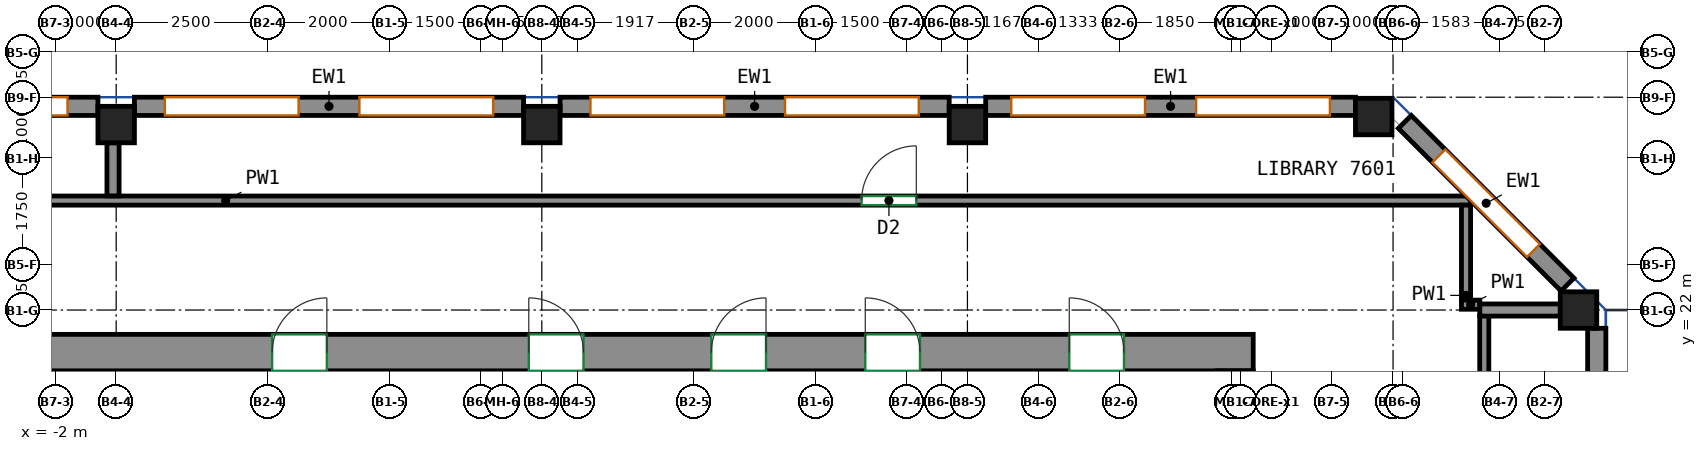
"""IFC4 building model, lengths in metres.
Left out: names, types, materials, properties, quantities, classifications, styles, units other than length and angle.
Written with IfcOpenShell. Run it as: python <this file> out.ifc"""

import sys

from ifc_helpers import new_model, si_unit, direction, frame, frame_2d, origin, origin_2d, place, context, subcontext, project, spatial, rectangle, extrude, source, transform, mapped, element, fill, save


model = new_model("IFC4")
c1 = context("Model", 3, precision=1e-05, world=origin(), true_north=direction((0.0, 1.0)))
c2 = subcontext(c1, "Body", "Model", "MODEL_VIEW")
j1 = project(units=[si_unit("LENGTHUNIT", "METRE"), si_unit("PLANEANGLEUNIT", "RADIAN")], contexts=[c1])
p1 = place(None, origin())
s1 = spatial("IfcSite", under=j1, at=p1, CompositionType="ELEMENT")
p2 = place(p1, origin())
s2 = spatial("IfcBuilding", under=s1, at=p2, CompositionType="ELEMENT")
p3 = place(p2, frame((0.0, 0.0, 305.2)))
s3 = spatial("IfcBuildingStorey", under=s2, at=p3, CompositionType="ELEMENT", Elevation=305.2)
m1 = source(origin(), c2, "Body", "SweptSolid", [
    extrude(rectangle(XDim=0.6, YDim=0.6, at=origin_2d()), origin(), (0.0, 0.0, 1.0), 3.12),
])
for number, where, z_axis, x_axis in (
    (1, (-1.0, 25.05, 0.0), (0.0, 0.0, 1.0), (1.0, 0.0, 0.0)),
    (2, (6.0, 25.05, 0.0), (0.0, 0.0, 1.0), (1.0, 0.0, 0.0)),
    (3, (13.0, 25.05, 0.0), (0.0, 0.0, 1.0), (1.0, 0.0, 0.0)),
    (4, (19.682, 25.182, 0.0), (0.0, 0.0, 1.0), (1.0, 0.0, 0.0)),
    (5, (23.05, 22.0, 0.0), (0.0, 0.0, 1.0), (1.0, 0.0, 0.0)),
):
    element("IfcColumn", number, at=place(p3, frame(where, z_axis=z_axis, x_axis=x_axis)), inside=s3, PredefinedType="COLUMN", context=c2, shape_type="MappedRepresentation", body=[
        mapped(m1, transform((0.0, 0.0, 0.0))),
    ])
m2 = source(origin(), c2, "Body", "SweptSolid", [
    extrude(rectangle(XDim=33.3, YDim=0.6, at=frame_2d((16.65, 0.0))), origin(), (0.0, 0.0, 1.0), 3.12),
])
p4 = place(p3, frame((-15.6, 21.3, 0.0), z_axis=(0.0, 0.0, 1.0), x_axis=(1.0, 0.0, 0.0)))
e6 = element("IfcWall", 6, at=p4, inside=s3, PredefinedType="SHEAR", context=c2, shape_type="MappedRepresentation", body=[
    mapped(m2, transform((0.0, 0.0, 0.0))),
])
p5 = place(p4, frame((6.431, 0.0, 0.0)))
e7 = element("IfcOpeningElement", 7, at=p5, cuts=e6, PredefinedType="OPENING", context=c2, shape_type="SweptSolid", body=[
    extrude(rectangle(XDim=0.9, YDim=2.1, at=frame_2d((0.45, 1.05))), frame((0.0, 0.31, 0.0), z_axis=(0.0, -1.0, 0.0), x_axis=(1.0, 0.0, 0.0)), (0.0, 0.0, 1.0), 0.62),
])
p6 = place(p4, frame((11.738, 0.0, 0.0)))
e8 = element("IfcOpeningElement", 8, at=p6, cuts=e6, PredefinedType="OPENING", context=c2, shape_type="SweptSolid", body=[
    extrude(rectangle(XDim=0.9, YDim=2.1, at=frame_2d((0.45, 1.05))), frame((0.0, 0.31, 0.0), z_axis=(0.0, -1.0, 0.0), x_axis=(1.0, 0.0, 0.0)), (0.0, 0.0, 1.0), 0.62),
])
p7 = place(p4, frame((17.165, 0.0, 0.0)))
e9 = element("IfcOpeningElement", 9, at=p7, cuts=e6, PredefinedType="OPENING", context=c2, shape_type="SweptSolid", body=[
    extrude(rectangle(XDim=0.9, YDim=2.1, at=frame_2d((0.45, 1.05))), frame((0.0, 0.31, 0.0), z_axis=(0.0, -1.0, 0.0), x_axis=(1.0, 0.0, 0.0)), (0.0, 0.0, 1.0), 0.62),
])
p8 = place(p4, frame((21.386, 0.0, 0.0)))
e10 = element("IfcOpeningElement", 10, at=p8, cuts=e6, PredefinedType="OPENING", context=c2, shape_type="SweptSolid", body=[
    extrude(rectangle(XDim=0.9, YDim=2.1, at=frame_2d((0.45, 1.05))), frame((0.0, 0.31, 0.0), z_axis=(0.0, -1.0, 0.0), x_axis=(1.0, 0.0, 0.0)), (0.0, 0.0, 1.0), 0.62),
])
p9 = place(p4, frame((24.387, 0.0, 0.0)))
e11 = element("IfcOpeningElement", 11, at=p9, cuts=e6, PredefinedType="OPENING", context=c2, shape_type="SweptSolid", body=[
    extrude(rectangle(XDim=0.9, YDim=2.1, at=frame_2d((0.45, 1.05))), frame((0.0, 0.31, 0.0), z_axis=(0.0, -1.0, 0.0), x_axis=(1.0, 0.0, 0.0)), (0.0, 0.0, 1.0), 0.62),
])
p10 = place(p4, frame((26.92, 0.0, 0.0)))
e12 = element("IfcOpeningElement", 12, at=p10, cuts=e6, PredefinedType="OPENING", context=c2, shape_type="SweptSolid", body=[
    extrude(rectangle(XDim=0.9, YDim=2.1, at=frame_2d((0.45, 1.05))), frame((0.0, 0.31, 0.0), z_axis=(0.0, -1.0, 0.0), x_axis=(1.0, 0.0, 0.0)), (0.0, 0.0, 1.0), 0.62),
])
p11 = place(p4, frame((2.125, 0.0, 0.0)))
e13 = element("IfcOpeningElement", 13, at=p11, cuts=e6, PredefinedType="OPENING", context=c2, shape_type="SweptSolid", body=[
    extrude(rectangle(XDim=0.9, YDim=2.1, at=frame_2d((0.45, 1.05))), frame((0.0, 0.31, 0.0), z_axis=(0.0, -1.0, 0.0), x_axis=(1.0, 0.0, 0.0)), (0.0, 0.0, 1.0), 0.62),
])
p12 = place(p4, frame((30.275, 0.0, 0.0)))
e14 = element("IfcOpeningElement", 14, at=p12, cuts=e6, PredefinedType="OPENING", context=c2, shape_type="SweptSolid", body=[
    extrude(rectangle(XDim=0.9, YDim=2.1, at=frame_2d((0.45, 1.05))), frame((0.0, 0.31, 0.0), z_axis=(0.0, -1.0, 0.0), x_axis=(1.0, 0.0, 0.0)), (0.0, 0.0, 1.0), 0.62),
])
m3 = source(origin(), c2, "Body", "SweptSolid", [
    extrude(rectangle(XDim=13.4, YDim=0.3, at=frame_2d((6.7, 0.0))), origin(), (0.0, 0.0, 1.0), 3.12),
])
p13 = place(p3, frame((23.35, 8.3, 0.0), z_axis=(0.0, 0.0, 1.0), x_axis=(0.0, 1.0, 0.0)))
e15 = element("IfcWall", 15, at=p13, inside=s3, PredefinedType="SOLIDWALL", context=c2, shape_type="MappedRepresentation", body=[
    mapped(m3, transform((0.0, 0.0, 0.0))),
])
p14 = place(p13, frame((0.85, 0.0, 0.8)))
e16 = element("IfcOpeningElement", 16, at=p14, cuts=e15, PredefinedType="OPENING", context=c2, shape_type="SweptSolid", body=[
    extrude(rectangle(XDim=1.5, YDim=2.05, at=frame_2d((0.75, 1.025))), frame((0.0, 0.16, 0.0), z_axis=(0.0, -1.0, 0.0), x_axis=(1.0, 0.0, 0.0)), (0.0, 0.0, 1.0), 0.32),
])
p15 = place(p13, frame((4.95, 0.0, 0.8)))
e17 = element("IfcOpeningElement", 17, at=p15, cuts=e15, PredefinedType="OPENING", context=c2, shape_type="SweptSolid", body=[
    extrude(rectangle(XDim=1.5, YDim=2.05, at=frame_2d((0.75, 1.025))), frame((0.0, 0.16, 0.0), z_axis=(0.0, -1.0, 0.0), x_axis=(1.0, 0.0, 0.0)), (0.0, 0.0, 1.0), 0.32),
])
p16 = place(p13, frame((3.65, 0.0, 0.0)))
e18 = element("IfcOpeningElement", 18, at=p16, cuts=e15, PredefinedType="OPENING", context=c2, shape_type="SweptSolid", body=[
    extrude(rectangle(XDim=1.0, YDim=2.1, at=frame_2d((0.5, 1.05))), frame((0.0, 0.16, 0.0), z_axis=(0.0, -1.0, 0.0), x_axis=(1.0, 0.0, 0.0)), (0.0, 0.0, 1.0), 0.32),
])
p17 = place(p13, frame((8.45, 0.0, 0.8)))
e19 = element("IfcOpeningElement", 19, at=p17, cuts=e15, PredefinedType="OPENING", context=c2, shape_type="SweptSolid", body=[
    extrude(rectangle(XDim=1.5, YDim=2.05, at=frame_2d((0.75, 1.025))), frame((0.0, 0.16, 0.0), z_axis=(0.0, -1.0, 0.0), x_axis=(1.0, 0.0, 0.0)), (0.0, 0.0, 1.0), 0.32),
])
p18 = place(p13, frame((11.05, 0.0, 0.8)))
e20 = element("IfcOpeningElement", 20, at=p18, cuts=e15, PredefinedType="OPENING", context=c2, shape_type="SweptSolid", body=[
    extrude(rectangle(XDim=1.5, YDim=2.05, at=frame_2d((0.75, 1.025))), frame((0.0, 0.16, 0.0), z_axis=(0.0, -1.0, 0.0), x_axis=(1.0, 0.0, 0.0)), (0.0, 0.0, 1.0), 0.32),
])
m4 = source(origin(), c2, "Body", "SweptSolid", [
    extrude(rectangle(XDim=3.783, YDim=0.3, at=frame_2d((1.892, 0.0))), origin(), (0.0, 0.0, 1.0), 3.12),
])
p19 = place(p3, frame((22.869, 22.419, 0.0), z_axis=(0.0, 0.0, 1.0), x_axis=(-0.707106781187, 0.707106781187, 0.0)))
e21 = element("IfcWall", 21, at=p19, inside=s3, PredefinedType="SOLIDWALL", context=c2, shape_type="MappedRepresentation", body=[
    mapped(m4, transform((0.0, 0.0, 0.0))),
])
p20 = place(p19, frame((0.792, 0.0, 0.8)))
e22 = element("IfcOpeningElement", 22, at=p20, cuts=e21, PredefinedType="OPENING", context=c2, shape_type="SweptSolid", body=[
    extrude(rectangle(XDim=2.2, YDim=2.05, at=frame_2d((1.1, 1.025))), frame((0.0, 0.16, 0.0), z_axis=(0.0, -1.0, 0.0), x_axis=(1.0, 0.0, 0.0)), (0.0, 0.0, 1.0), 0.32),
])
m5 = source(origin(), c2, "Body", "SweptSolid", [
    extrude(rectangle(XDim=6.082, YDim=0.3, at=frame_2d((3.041, 0.0))), origin(), (0.0, 0.0, 1.0), 3.12),
])
p21 = place(p3, frame((19.382, 25.35, 0.0), z_axis=(0.0, 0.0, 1.0), x_axis=(-1.0, 0.0, 0.0)))
e23 = element("IfcWall", 23, at=p21, inside=s3, PredefinedType="SOLIDWALL", context=c2, shape_type="MappedRepresentation", body=[
    mapped(m5, transform((0.0, 0.0, 0.0))),
])
p22 = place(p21, frame((0.42, 0.0, 0.8)))
e24 = element("IfcOpeningElement", 24, at=p22, cuts=e23, PredefinedType="OPENING", context=c2, shape_type="SweptSolid", body=[
    extrude(rectangle(XDim=2.2, YDim=2.05, at=frame_2d((1.1, 1.025))), frame((0.0, 0.16, 0.0), z_axis=(0.0, -1.0, 0.0), x_axis=(1.0, 0.0, 0.0)), (0.0, 0.0, 1.0), 0.32),
])
p23 = place(p21, frame((3.461, 0.0, 0.8)))
e25 = element("IfcOpeningElement", 25, at=p23, cuts=e23, PredefinedType="OPENING", context=c2, shape_type="SweptSolid", body=[
    extrude(rectangle(XDim=2.2, YDim=2.05, at=frame_2d((1.1, 1.025))), frame((0.0, 0.16, 0.0), z_axis=(0.0, -1.0, 0.0), x_axis=(1.0, 0.0, 0.0)), (0.0, 0.0, 1.0), 0.32),
])
m6 = source(origin(), c2, "Body", "SweptSolid", [
    extrude(rectangle(XDim=6.4, YDim=0.3, at=frame_2d((3.2, 0.0))), origin(), (0.0, 0.0, 1.0), 3.12),
])
p24 = place(p3, frame((12.7, 25.35, 0.0), z_axis=(0.0, 0.0, 1.0), x_axis=(-1.0, 0.0, 0.0)))
e26 = element("IfcWall", 26, at=p24, inside=s3, PredefinedType="SOLIDWALL", context=c2, shape_type="MappedRepresentation", body=[
    mapped(m6, transform((0.0, 0.0, 0.0))),
])
p25 = place(p24, frame((0.5, 0.0, 0.8)))
e27 = element("IfcOpeningElement", 27, at=p25, cuts=e26, PredefinedType="OPENING", context=c2, shape_type="SweptSolid", body=[
    extrude(rectangle(XDim=2.2, YDim=2.05, at=frame_2d((1.1, 1.025))), frame((0.0, 0.16, 0.0), z_axis=(0.0, -1.0, 0.0), x_axis=(1.0, 0.0, 0.0)), (0.0, 0.0, 1.0), 0.32),
])
p26 = place(p24, frame((3.7, 0.0, 0.8)))
e28 = element("IfcOpeningElement", 28, at=p26, cuts=e26, PredefinedType="OPENING", context=c2, shape_type="SweptSolid", body=[
    extrude(rectangle(XDim=2.2, YDim=2.05, at=frame_2d((1.1, 1.025))), frame((0.0, 0.16, 0.0), z_axis=(0.0, -1.0, 0.0), x_axis=(1.0, 0.0, 0.0)), (0.0, 0.0, 1.0), 0.32),
])
p27 = place(p3, frame((5.7, 25.35, 0.0), z_axis=(0.0, 0.0, 1.0), x_axis=(-1.0, 0.0, 0.0)))
e29 = element("IfcWall", 29, at=p27, inside=s3, PredefinedType="SOLIDWALL", context=c2, shape_type="MappedRepresentation", body=[
    mapped(m6, transform((0.0, 0.0, 0.0))),
])
p28 = place(p27, frame((0.5, 0.0, 0.8)))
e30 = element("IfcOpeningElement", 30, at=p28, cuts=e29, PredefinedType="OPENING", context=c2, shape_type="SweptSolid", body=[
    extrude(rectangle(XDim=2.2, YDim=2.05, at=frame_2d((1.1, 1.025))), frame((0.0, 0.16, 0.0), z_axis=(0.0, -1.0, 0.0), x_axis=(1.0, 0.0, 0.0)), (0.0, 0.0, 1.0), 0.32),
])
p29 = place(p27, frame((3.7, 0.0, 0.8)))
e31 = element("IfcOpeningElement", 31, at=p29, cuts=e29, PredefinedType="OPENING", context=c2, shape_type="SweptSolid", body=[
    extrude(rectangle(XDim=2.2, YDim=2.05, at=frame_2d((1.1, 1.025))), frame((0.0, 0.16, 0.0), z_axis=(0.0, -1.0, 0.0), x_axis=(1.0, 0.0, 0.0)), (0.0, 0.0, 1.0), 0.32),
])
p30 = place(p3, frame((-1.3, 25.35, 0.0), z_axis=(0.0, 0.0, 1.0), x_axis=(-1.0, 0.0, 0.0)))
e32 = element("IfcWall", 32, at=p30, inside=s3, PredefinedType="SOLIDWALL", context=c2, shape_type="MappedRepresentation", body=[
    mapped(m6, transform((0.0, 0.0, 0.0))),
])
p31 = place(p30, frame((0.5, 0.0, 0.8)))
e33 = element("IfcOpeningElement", 33, at=p31, cuts=e32, PredefinedType="OPENING", context=c2, shape_type="SweptSolid", body=[
    extrude(rectangle(XDim=2.2, YDim=2.05, at=frame_2d((1.1, 1.025))), frame((0.0, 0.16, 0.0), z_axis=(0.0, -1.0, 0.0), x_axis=(1.0, 0.0, 0.0)), (0.0, 0.0, 1.0), 0.32),
])
p32 = place(p30, frame((3.7, 0.0, 0.8)))
e34 = element("IfcOpeningElement", 34, at=p32, cuts=e32, PredefinedType="OPENING", context=c2, shape_type="SweptSolid", body=[
    extrude(rectangle(XDim=2.2, YDim=2.05, at=frame_2d((1.1, 1.025))), frame((0.0, 0.16, 0.0), z_axis=(0.0, -1.0, 0.0), x_axis=(1.0, 0.0, 0.0)), (0.0, 0.0, 1.0), 0.32),
])
p33 = place(p3, frame((21.5, -7.75, 0.0), z_axis=(0.0, 0.0, 1.0), x_axis=(0.0, 1.0, 0.0)))
e35 = element("IfcWall", 35, at=p33, inside=s3, PredefinedType="PARTITIONING", context=c2, shape_type="SweptSolid", body=[
    extrude(rectangle(XDim=29.66, YDim=0.15, at=frame_2d((14.83, 0.0))), origin(), (0.0, 0.0, 1.0), 3.12),
])
p34 = place(p33, frame((20.142, 0.0, 0.0)))
e36 = element("IfcOpeningElement", 36, at=p34, cuts=e35, PredefinedType="OPENING", context=c2, shape_type="SweptSolid", body=[
    extrude(rectangle(XDim=0.9, YDim=2.1, at=frame_2d((0.45, 1.05))), frame((0.0, 0.085, 0.0), z_axis=(0.0, -1.0, 0.0), x_axis=(1.0, 0.0, 0.0)), (0.0, 0.0, 1.0), 0.17),
])
p35 = place(p3, frame((-19.675, 23.8, 0.0), z_axis=(0.0, 0.0, 1.0), x_axis=(1.0, 0.0, 0.0)))
e37 = element("IfcWall", 37, at=p35, inside=s3, PredefinedType="PARTITIONING", context=c2, shape_type="SweptSolid", body=[
    extrude(rectangle(XDim=40.95, YDim=0.15, at=frame_2d((20.475, 0.0))), origin(), (0.0, 0.0, 1.0), 3.12),
])
p36 = place(p35, frame((8.716, 0.0, 0.0)))
e38 = element("IfcOpeningElement", 38, at=p36, cuts=e37, PredefinedType="OPENING", context=c2, shape_type="SweptSolid", body=[
    extrude(rectangle(XDim=0.9, YDim=2.1, at=frame_2d((0.45, 1.05))), frame((0.0, 0.085, 0.0), z_axis=(0.0, -1.0, 0.0), x_axis=(1.0, 0.0, 0.0)), (0.0, 0.0, 1.0), 0.17),
])
p37 = place(p35, frame((30.934, 0.0, 0.0)))
e39 = element("IfcOpeningElement", 39, at=p37, cuts=e37, PredefinedType="OPENING", context=c2, shape_type="SweptSolid", body=[
    extrude(rectangle(XDim=0.9, YDim=2.1, at=frame_2d((0.45, 1.05))), frame((0.0, 0.085, 0.0), z_axis=(0.0, -1.0, 0.0), x_axis=(1.0, 0.0, 0.0)), (0.0, 0.0, 1.0), 0.17),
])
p38 = place(p3, frame((21.2, 22.163, 0.0), z_axis=(0.0, 0.0, 1.0), x_axis=(0.0, 1.0, 0.0)))
e40 = element("IfcWall", 40, at=p38, inside=s3, PredefinedType="PARTITIONING", context=c2, shape_type="SweptSolid", body=[
    extrude(rectangle(XDim=1.562, YDim=0.15, at=frame_2d((0.781, 0.0))), origin(), (0.0, 0.0, 1.0), 3.12),
])
p39 = place(p3, frame((21.427, 22.088, 0.0), z_axis=(0.0, 0.0, 1.0), x_axis=(-1.0, 0.0, 0.0)))
e41 = element("IfcWall", 41, at=p39, inside=s3, PredefinedType="PARTITIONING", context=c2, shape_type="SweptSolid", body=[
    extrude(rectangle(XDim=0.302, YDim=0.15, at=frame_2d((0.151, 0.0))), origin(), (0.0, 0.0, 1.0), 3.12),
])
p40 = place(p3, frame((22.75, 22.0, 0.0), z_axis=(0.0, 0.0, 1.0), x_axis=(-1.0, 0.0, 0.0)))
e42 = element("IfcWall", 42, at=p40, inside=s3, PredefinedType="PARTITIONING", context=c2, shape_type="SweptSolid", body=[
    extrude(rectangle(XDim=1.323, YDim=0.2, at=frame_2d((0.662, 0.0))), origin(), (0.0, 0.0, 1.0), 3.12),
])
p41 = place(p3, frame((-1.052, 23.877, 0.0), z_axis=(0.0, 0.0, 1.0), x_axis=(0.0, 1.0, 0.0)))
e43 = element("IfcWall", 43, at=p41, inside=s3, PredefinedType="PARTITIONING", context=c2, shape_type="SweptSolid", body=[
    extrude(rectangle(XDim=0.873, YDim=0.2, at=frame_2d((0.437, 0.0))), origin(), (0.0, 0.0, 1.0), 3.12),
])
p42 = place(p20, origin())
e44 = element("IfcWindow", 44, at=p42, inside=s3, PartitioningType="SINGLE_PANEL", PredefinedType="WINDOW", context=c2, shape_type="SweptSolid", body=[
    extrude(rectangle(XDim=2.2, YDim=2.05, at=frame_2d((1.1, 1.025))), frame((0.0, 0.03, 0.0), z_axis=(0.0, -1.0, 0.0), x_axis=(1.0, 0.0, 0.0)), (0.0, 0.0, 1.0), 0.06),
])
fill(e22, e44)
p43 = place(p22, origin())
e45 = element("IfcWindow", 45, at=p43, inside=s3, PartitioningType="SINGLE_PANEL", PredefinedType="WINDOW", context=c2, shape_type="SweptSolid", body=[
    extrude(rectangle(XDim=2.2, YDim=2.05, at=frame_2d((1.1, 1.025))), frame((0.0, 0.03, 0.0), z_axis=(0.0, -1.0, 0.0), x_axis=(1.0, 0.0, 0.0)), (0.0, 0.0, 1.0), 0.06),
])
fill(e24, e45)
p44 = place(p23, origin())
e46 = element("IfcWindow", 46, at=p44, inside=s3, PartitioningType="SINGLE_PANEL", PredefinedType="WINDOW", context=c2, shape_type="SweptSolid", body=[
    extrude(rectangle(XDim=2.2, YDim=2.05, at=frame_2d((1.1, 1.025))), frame((0.0, 0.03, 0.0), z_axis=(0.0, -1.0, 0.0), x_axis=(1.0, 0.0, 0.0)), (0.0, 0.0, 1.0), 0.06),
])
fill(e25, e46)
p45 = place(p25, origin())
e47 = element("IfcWindow", 47, at=p45, inside=s3, PartitioningType="SINGLE_PANEL", PredefinedType="WINDOW", context=c2, shape_type="SweptSolid", body=[
    extrude(rectangle(XDim=2.2, YDim=2.05, at=frame_2d((1.1, 1.025))), frame((0.0, 0.03, 0.0), z_axis=(0.0, -1.0, 0.0), x_axis=(1.0, 0.0, 0.0)), (0.0, 0.0, 1.0), 0.06),
])
fill(e27, e47)
p46 = place(p26, origin())
e48 = element("IfcWindow", 48, at=p46, inside=s3, PartitioningType="SINGLE_PANEL", PredefinedType="WINDOW", context=c2, shape_type="SweptSolid", body=[
    extrude(rectangle(XDim=2.2, YDim=2.05, at=frame_2d((1.1, 1.025))), frame((0.0, 0.03, 0.0), z_axis=(0.0, -1.0, 0.0), x_axis=(1.0, 0.0, 0.0)), (0.0, 0.0, 1.0), 0.06),
])
fill(e28, e48)
p47 = place(p28, origin())
e49 = element("IfcWindow", 49, at=p47, inside=s3, PartitioningType="SINGLE_PANEL", PredefinedType="WINDOW", context=c2, shape_type="SweptSolid", body=[
    extrude(rectangle(XDim=2.2, YDim=2.05, at=frame_2d((1.1, 1.025))), frame((0.0, 0.03, 0.0), z_axis=(0.0, -1.0, 0.0), x_axis=(1.0, 0.0, 0.0)), (0.0, 0.0, 1.0), 0.06),
])
fill(e30, e49)
p48 = place(p29, origin())
e50 = element("IfcWindow", 50, at=p48, inside=s3, PartitioningType="SINGLE_PANEL", PredefinedType="WINDOW", context=c2, shape_type="SweptSolid", body=[
    extrude(rectangle(XDim=2.2, YDim=2.05, at=frame_2d((1.1, 1.025))), frame((0.0, 0.03, 0.0), z_axis=(0.0, -1.0, 0.0), x_axis=(1.0, 0.0, 0.0)), (0.0, 0.0, 1.0), 0.06),
])
fill(e31, e50)
p49 = place(p31, origin())
e51 = element("IfcWindow", 51, at=p49, inside=s3, PartitioningType="SINGLE_PANEL", PredefinedType="WINDOW", context=c2, shape_type="SweptSolid", body=[
    extrude(rectangle(XDim=2.2, YDim=2.05, at=frame_2d((1.1, 1.025))), frame((0.0, 0.03, 0.0), z_axis=(0.0, -1.0, 0.0), x_axis=(1.0, 0.0, 0.0)), (0.0, 0.0, 1.0), 0.06),
])
fill(e33, e51)
p50 = place(p7, origin())
e52 = element("IfcDoor", 52, at=p50, inside=s3, OperationType="SINGLE_SWING_RIGHT", PredefinedType="DOOR", context=c2, shape_type="SweptSolid", body=[
    extrude(rectangle(XDim=0.9, YDim=2.1, at=frame_2d((0.45, 1.05))), frame((0.0, -0.155, 0.0), z_axis=(0.0, -1.0, 0.0), x_axis=(1.0, 0.0, 0.0)), (0.0, 0.0, 1.0), 0.05),
])
fill(e9, e52)
p51 = place(p8, origin())
e53 = element("IfcDoor", 53, at=p51, inside=s3, OperationType="SINGLE_SWING_LEFT", PredefinedType="DOOR", context=c2, shape_type="SweptSolid", body=[
    extrude(rectangle(XDim=0.9, YDim=2.1, at=frame_2d((0.45, 1.05))), frame((0.0, -0.155, 0.0), z_axis=(0.0, -1.0, 0.0), x_axis=(1.0, 0.0, 0.0)), (0.0, 0.0, 1.0), 0.05),
])
fill(e10, e53)
p52 = place(p9, origin())
e54 = element("IfcDoor", 54, at=p52, inside=s3, OperationType="SINGLE_SWING_RIGHT", PredefinedType="DOOR", context=c2, shape_type="SweptSolid", body=[
    extrude(rectangle(XDim=0.9, YDim=2.1, at=frame_2d((0.45, 1.05))), frame((0.0, -0.155, 0.0), z_axis=(0.0, -1.0, 0.0), x_axis=(1.0, 0.0, 0.0)), (0.0, 0.0, 1.0), 0.05),
])
fill(e11, e54)
p53 = place(p10, origin())
e55 = element("IfcDoor", 55, at=p53, inside=s3, OperationType="SINGLE_SWING_LEFT", PredefinedType="DOOR", context=c2, shape_type="SweptSolid", body=[
    extrude(rectangle(XDim=0.9, YDim=2.1, at=frame_2d((0.45, 1.05))), frame((0.0, -0.155, 0.0), z_axis=(0.0, -1.0, 0.0), x_axis=(1.0, 0.0, 0.0)), (0.0, 0.0, 1.0), 0.05),
])
fill(e12, e55)
p54 = place(p12, origin())
e56 = element("IfcDoor", 56, at=p54, inside=s3, OperationType="SINGLE_SWING_LEFT", PredefinedType="DOOR", context=c2, shape_type="SweptSolid", body=[
    extrude(rectangle(XDim=0.9, YDim=2.1, at=frame_2d((0.45, 1.05))), frame((0.0, -0.155, 0.0), z_axis=(0.0, -1.0, 0.0), x_axis=(1.0, 0.0, 0.0)), (0.0, 0.0, 1.0), 0.05),
])
fill(e14, e56)
p55 = place(p37, origin())
e57 = element("IfcDoor", 57, at=p55, inside=s3, OperationType="SINGLE_SWING_RIGHT", PredefinedType="DOOR", context=c2, shape_type="SweptSolid", body=[
    extrude(rectangle(XDim=0.9, YDim=2.1, at=frame_2d((0.45, 1.05))), frame((0.0, 0.025, 0.0), z_axis=(0.0, -1.0, 0.0), x_axis=(1.0, 0.0, 0.0)), (0.0, 0.0, 1.0), 0.05),
])
fill(e39, e57)
save(model, sys.argv[1])
